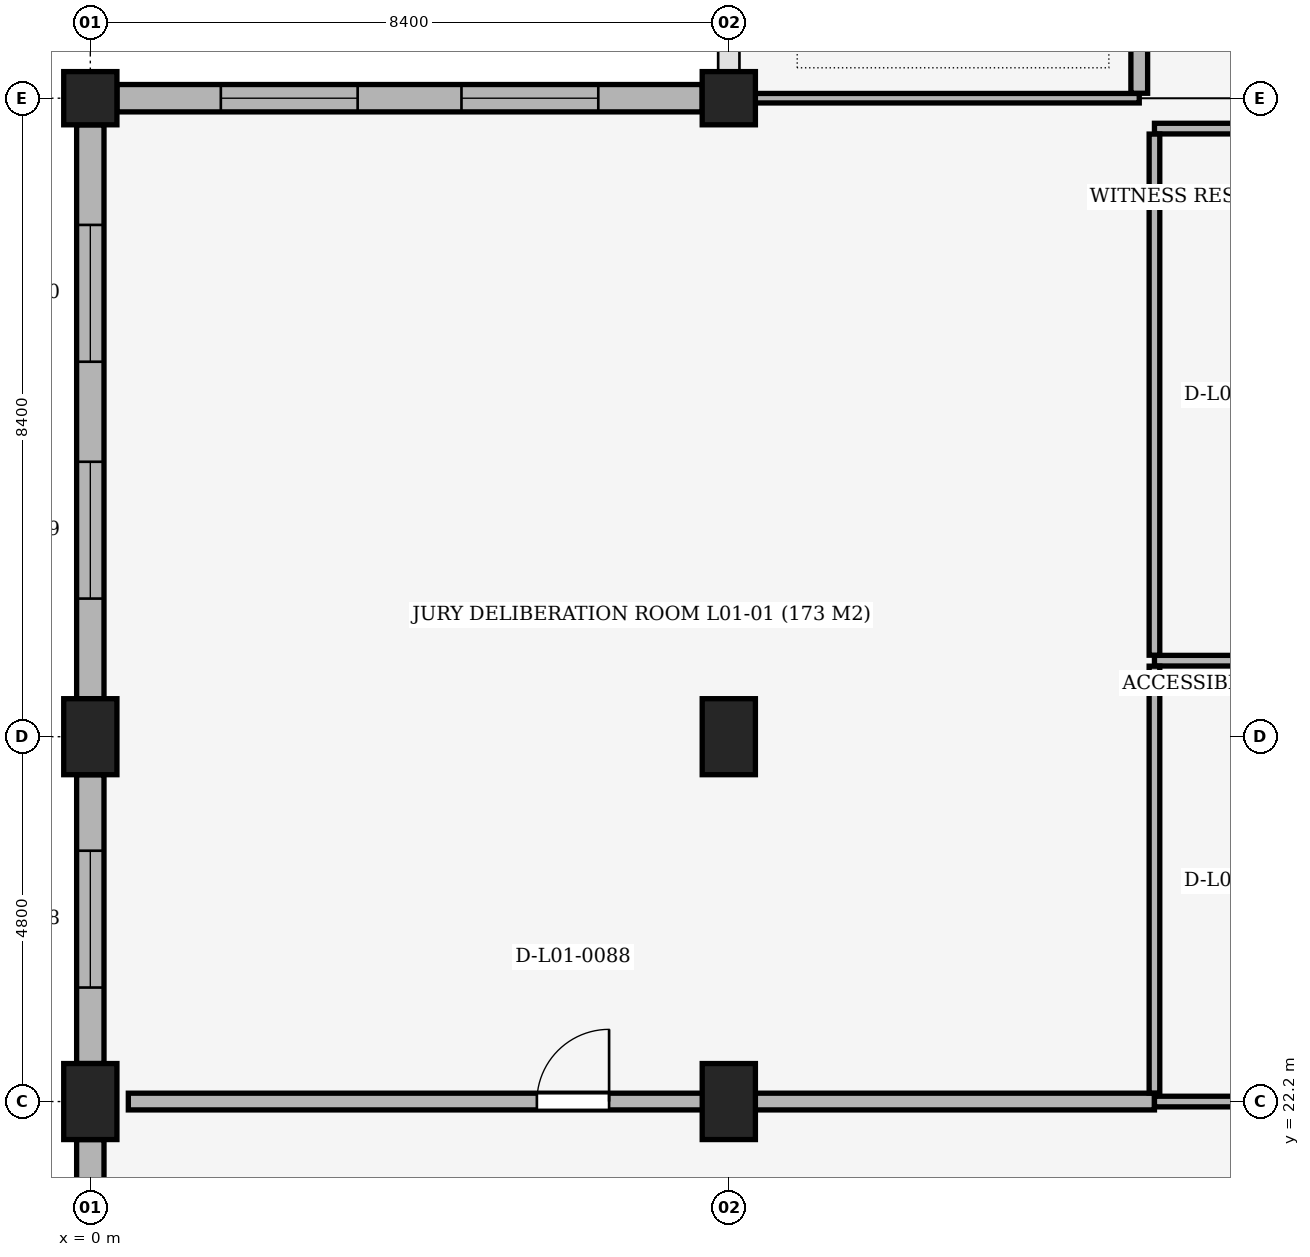
"""IFC4 building model, lengths in metres.
Left out: names, types, materials, properties, quantities, classifications, styles, units other than length and angle.
Written with IfcOpenShell. Run it as: python <this file> out.ifc"""

import sys

from ifc_helpers import new_model, si_unit, direction, frame, frame_2d, origin, origin_2d, place, context, subcontext, project, spatial, rectangle, extrude, element, fill, save


model = new_model("IFC4")
c1 = context("Model", 3, precision=1e-05, world=origin(), true_north=direction((0.0, 1.0)))
c2 = subcontext(c1, "Body", "Model", "MODEL_VIEW")
j1 = project(units=[si_unit("LENGTHUNIT", "METRE"), si_unit("PLANEANGLEUNIT", "RADIAN")], contexts=[c1])
p1 = place(None, origin())
s1 = spatial("IfcSite", under=j1, at=p1, CompositionType="ELEMENT")
p2 = place(p1, origin())
s2 = spatial("IfcBuilding", under=s1, at=p2, CompositionType="ELEMENT")
p3 = place(p2, frame((0.0, 0.0, 5.1)))
s3 = spatial("IfcBuildingStorey", under=s2, at=p3, CompositionType="ELEMENT", Elevation=5.1)
for number, where, z_axis, x_axis in (
    (1, (0.0, 22.2, 0.0), (0.0, 0.0, 1.0), (1.0, 0.0, 0.0)),
    (2, (0.0, 27.0, 0.0), (0.0, 0.0, 1.0), (1.0, 0.0, 0.0)),
):
    element("IfcColumn", number, at=place(p3, frame(where, z_axis=z_axis, x_axis=x_axis)), inside=s3, PredefinedType="COLUMN", context=c2, shape_type="SweptSolid", body=[
        extrude(rectangle(XDim=0.7, YDim=1.0, at=origin_2d()), origin(), (0.0, 0.0, 1.0), 5.1),
    ])
p4 = place(p3, frame((0.0, 35.4, 0.0), z_axis=(0.0, 0.0, 1.0), x_axis=(1.0, 0.0, 0.0)))
e3 = element("IfcColumn", 3, at=p4, inside=s3, PredefinedType="COLUMN", context=c2, shape_type="SweptSolid", body=[
    extrude(rectangle(XDim=0.7, YDim=0.7, at=origin_2d()), origin(), (0.0, 0.0, 1.0), 5.1),
])
for number, where, z_axis, x_axis in (
    (4, (8.4, 22.2, 0.0), (0.0, 0.0, 1.0), (1.0, 0.0, 0.0)),
    (5, (8.4, 27.0, 0.0), (0.0, 0.0, 1.0), (1.0, 0.0, 0.0)),
):
    element("IfcColumn", number, at=place(p3, frame(where, z_axis=z_axis, x_axis=x_axis)), inside=s3, PredefinedType="COLUMN", context=c2, shape_type="SweptSolid", body=[
        extrude(rectangle(XDim=0.7, YDim=1.0, at=origin_2d()), origin(), (0.0, 0.0, 1.0), 5.1),
    ])
p5 = place(p3, frame((8.4, 35.4, 0.0), z_axis=(0.0, 0.0, 1.0), x_axis=(1.0, 0.0, 0.0)))
e6 = element("IfcColumn", 6, at=p5, inside=s3, PredefinedType="COLUMN", context=c2, shape_type="SweptSolid", body=[
    extrude(rectangle(XDim=0.7, YDim=0.7, at=origin_2d()), origin(), (0.0, 0.0, 1.0), 5.1),
])
p6 = place(p3, frame((0.0, 5.9, 0.0), z_axis=(0.0, 0.0, 1.0), x_axis=(0.0, 1.0, 0.0)))
e7 = element("IfcWall", 7, at=p6, inside=s3, PredefinedType="SOLIDWALL", context=c2, shape_type="SweptSolid", body=[
    extrude(rectangle(XDim=15.8, YDim=0.36, at=frame_2d((7.9, 0.0))), origin(), (0.0, 0.0, 1.0), 3.67),
])
p7 = place(p6, frame((4.067, 0.0, 0.85)))
e8 = element("IfcOpeningElement", 8, at=p7, cuts=e7, PredefinedType="OPENING", context=c2, shape_type="SweptSolid", body=[
    extrude(rectangle(XDim=1.8, YDim=2.4, at=frame_2d((0.9, 1.2))), frame((0.0, 0.195, 0.0), z_axis=(0.0, -1.0, 0.0), x_axis=(1.0, 0.0, 0.0)), (0.0, 0.0, 1.0), 0.39),
])
p8 = place(p6, frame((9.933, 0.0, 0.85)))
e9 = element("IfcOpeningElement", 9, at=p8, cuts=e7, PredefinedType="OPENING", context=c2, shape_type="SweptSolid", body=[
    extrude(rectangle(XDim=1.8, YDim=2.4, at=frame_2d((0.9, 1.2))), frame((0.0, 0.195, 0.0), z_axis=(0.0, -1.0, 0.0), x_axis=(1.0, 0.0, 0.0)), (0.0, 0.0, 1.0), 0.39),
])
p9 = place(p3, frame((0.0, 22.7, 0.0), z_axis=(0.0, 0.0, 1.0), x_axis=(0.0, 1.0, 0.0)))
e10 = element("IfcWall", 10, at=p9, inside=s3, PredefinedType="SOLIDWALL", context=c2, shape_type="SweptSolid", body=[
    extrude(rectangle(XDim=3.8, YDim=0.36, at=frame_2d((1.9, 0.0))), origin(), (0.0, 0.0, 1.0), 4.27),
])
p10 = place(p9, frame((1.0, 0.0, 0.85)))
e11 = element("IfcOpeningElement", 11, at=p10, cuts=e10, PredefinedType="OPENING", context=c2, shape_type="SweptSolid", body=[
    extrude(rectangle(XDim=1.8, YDim=2.4, at=frame_2d((0.9, 1.2))), frame((0.0, 0.195, 0.0), z_axis=(0.0, -1.0, 0.0), x_axis=(1.0, 0.0, 0.0)), (0.0, 0.0, 1.0), 0.39),
])
p11 = place(p3, frame((0.0, 27.5, 0.0), z_axis=(0.0, 0.0, 1.0), x_axis=(0.0, 1.0, 0.0)))
e12 = element("IfcWall", 12, at=p11, inside=s3, PredefinedType="SOLIDWALL", context=c2, shape_type="SweptSolid", body=[
    extrude(rectangle(XDim=7.55, YDim=0.36, at=frame_2d((3.775, 0.0))), origin(), (0.0, 0.0, 1.0), 4.02),
])
p12 = place(p11, frame((1.317, 0.0, 0.85)))
e13 = element("IfcOpeningElement", 13, at=p12, cuts=e12, PredefinedType="OPENING", context=c2, shape_type="SweptSolid", body=[
    extrude(rectangle(XDim=1.8, YDim=2.4, at=frame_2d((0.9, 1.2))), frame((0.0, 0.195, 0.0), z_axis=(0.0, -1.0, 0.0), x_axis=(1.0, 0.0, 0.0)), (0.0, 0.0, 1.0), 0.39),
])
p13 = place(p11, frame((4.433, 0.0, 0.85)))
e14 = element("IfcOpeningElement", 14, at=p13, cuts=e12, PredefinedType="OPENING", context=c2, shape_type="SweptSolid", body=[
    extrude(rectangle(XDim=1.8, YDim=2.4, at=frame_2d((0.9, 1.2))), frame((0.0, 0.195, 0.0), z_axis=(0.0, -1.0, 0.0), x_axis=(1.0, 0.0, 0.0)), (0.0, 0.0, 1.0), 0.39),
])
p14 = place(p3, frame((0.35, 35.4, 0.0), z_axis=(0.0, 0.0, 1.0), x_axis=(1.0, 0.0, 0.0)))
e15 = element("IfcWall", 15, at=p14, inside=s3, PredefinedType="SOLIDWALL", context=c2, shape_type="SweptSolid", body=[
    extrude(rectangle(XDim=7.7, YDim=0.36, at=frame_2d((3.85, 0.0))), origin(), (0.0, 0.0, 1.0), 4.07),
])
p15 = place(p14, frame((1.367, 0.0, 0.85)))
e16 = element("IfcOpeningElement", 16, at=p15, cuts=e15, PredefinedType="OPENING", context=c2, shape_type="SweptSolid", body=[
    extrude(rectangle(XDim=1.8, YDim=2.4, at=frame_2d((0.9, 1.2))), frame((0.0, 0.195, 0.0), z_axis=(0.0, -1.0, 0.0), x_axis=(1.0, 0.0, 0.0)), (0.0, 0.0, 1.0), 0.39),
])
p16 = place(p14, frame((4.533, 0.0, 0.85)))
e17 = element("IfcOpeningElement", 17, at=p16, cuts=e15, PredefinedType="OPENING", context=c2, shape_type="SweptSolid", body=[
    extrude(rectangle(XDim=1.8, YDim=2.4, at=frame_2d((0.9, 1.2))), frame((0.0, 0.195, 0.0), z_axis=(0.0, -1.0, 0.0), x_axis=(1.0, 0.0, 0.0)), (0.0, 0.0, 1.0), 0.39),
])
p17 = place(p3, frame((0.5, 22.2, 0.0), z_axis=(0.0, 0.0, 1.0), x_axis=(1.0, 0.0, 0.0)))
e18 = element("IfcWall", 18, at=p17, inside=s3, PredefinedType="PARTITIONING", context=c2, shape_type="SweptSolid", body=[
    extrude(rectangle(XDim=13.5, YDim=0.22, at=frame_2d((6.75, 0.0))), origin(), (0.0, 0.0, 1.0), 4.07),
])
p18 = place(p17, frame((5.375, 0.0, 0.0)))
e19 = element("IfcOpeningElement", 19, at=p18, cuts=e18, PredefinedType="OPENING", context=c2, shape_type="SweptSolid", body=[
    extrude(rectangle(XDim=0.95, YDim=2.1, at=frame_2d((0.475, 1.05))), frame((0.0, 0.125, 0.0), z_axis=(0.0, -1.0, 0.0), x_axis=(1.0, 0.0, 0.0)), (0.0, 0.0, 1.0), 0.25),
])
p19 = place(p3, frame((14.0, 22.2, 0.0), z_axis=(0.0, 0.0, 1.0), x_axis=(1.0, 0.0, 0.0)))
e20 = element("IfcWall", 20, at=p19, inside=s3, PredefinedType="PARTITIONING", context=c2, shape_type="SweptSolid", body=[
    extrude(rectangle(XDim=3.6, YDim=0.14, at=frame_2d((1.8, 0.0))), origin(), (0.0, 0.0, 1.0), 4.07),
])
for number, where, z_axis, x_axis in (
    (21, (14.0, 28.0, 0.0), (0.0, 0.0, 1.0), (1.0, 0.0, 0.0)),
    (22, (14.0, 35.0, 0.0), (0.0, 0.0, 1.0), (1.0, 0.0, 0.0)),
):
    element("IfcWall", number, at=place(p3, frame(where, z_axis=z_axis, x_axis=x_axis)), inside=s3, PredefinedType="PARTITIONING", context=c2, shape_type="SweptSolid", body=[
        extrude(rectangle(XDim=3.6, YDim=0.14, at=frame_2d((1.8, 0.0))), origin(), (0.0, 0.0, 1.0), 4.02),
    ])
p20 = place(p3, frame((8.425, 35.4, 0.0), z_axis=(0.0, 0.0, 1.0), x_axis=(1.0, 0.0, 0.0)))
e23 = element("IfcWall", 23, at=p20, inside=s3, PredefinedType="PARTITIONING", context=c2, shape_type="SweptSolid", body=[
    extrude(rectangle(XDim=5.375, YDim=0.125, at=frame_2d((2.688, 0.0))), origin(), (0.0, 0.0, 1.0), 4.07),
])
p21 = place(p3, frame((13.8, 35.465, 0.0), z_axis=(0.0, 0.0, 1.0), x_axis=(0.0, 1.0, 0.0)))
e24 = element("IfcWall", 24, at=p21, inside=s3, PredefinedType="PARTITIONING", context=c2, shape_type="SweptSolid", body=[
    extrude(rectangle(XDim=64.058, YDim=0.22, at=frame_2d((32.029, 0.0))), origin(), (0.0, 0.0, 1.0), 4.07),
])
p22 = place(p21, frame((31.229, 0.0, 0.0)))
e25 = element("IfcOpeningElement", 25, at=p22, cuts=e24, PredefinedType="OPENING", context=c2, shape_type="SweptSolid", body=[
    extrude(rectangle(XDim=1.6, YDim=2.3, at=frame_2d((0.8, 1.15))), frame((0.0, 0.125, 0.0), z_axis=(0.0, -1.0, 0.0), x_axis=(1.0, 0.0, 0.0)), (0.0, 0.0, 1.0), 0.25),
])
p23 = place(p3, frame((14.0, 22.312, 0.0), z_axis=(0.0, 0.0, 1.0), x_axis=(0.0, 1.0, 0.0)))
e26 = element("IfcWall", 26, at=p23, inside=s3, PredefinedType="PARTITIONING", context=c2, shape_type="SweptSolid", body=[
    extrude(rectangle(XDim=5.616, YDim=0.14, at=frame_2d((2.808, 0.0))), origin(), (0.0, 0.0, 1.0), 4.07),
])
p24 = place(p3, frame((14.0, 28.072, 0.0), z_axis=(0.0, 0.0, 1.0), x_axis=(0.0, 1.0, 0.0)))
e27 = element("IfcWall", 27, at=p24, inside=s3, PredefinedType="PARTITIONING", context=c2, shape_type="SweptSolid", body=[
    extrude(rectangle(XDim=6.856, YDim=0.14, at=frame_2d((3.428, 0.0))), origin(), (0.0, 0.0, 1.0), 4.37),
])
p25 = place(p10, origin())
e28 = element("IfcWindow", 28, at=p25, inside=s3, PartitioningType="SINGLE_PANEL", PredefinedType="WINDOW", context=c2, shape_type="SweptSolid", body=[
    extrude(rectangle(XDim=1.8, YDim=2.4, at=frame_2d((0.9, 1.2))), frame((0.0, 0.03, 0.0), z_axis=(0.0, -1.0, 0.0), x_axis=(1.0, 0.0, 0.0)), (0.0, 0.0, 1.0), 0.06),
])
fill(e11, e28)
p26 = place(p12, origin())
e29 = element("IfcWindow", 29, at=p26, inside=s3, PartitioningType="SINGLE_PANEL", PredefinedType="WINDOW", context=c2, shape_type="SweptSolid", body=[
    extrude(rectangle(XDim=1.8, YDim=2.4, at=frame_2d((0.9, 1.2))), frame((0.0, 0.03, 0.0), z_axis=(0.0, -1.0, 0.0), x_axis=(1.0, 0.0, 0.0)), (0.0, 0.0, 1.0), 0.06),
])
fill(e13, e29)
p27 = place(p13, origin())
e30 = element("IfcWindow", 30, at=p27, inside=s3, PartitioningType="SINGLE_PANEL", PredefinedType="WINDOW", context=c2, shape_type="SweptSolid", body=[
    extrude(rectangle(XDim=1.8, YDim=2.4, at=frame_2d((0.9, 1.2))), frame((0.0, 0.03, 0.0), z_axis=(0.0, -1.0, 0.0), x_axis=(1.0, 0.0, 0.0)), (0.0, 0.0, 1.0), 0.06),
])
fill(e14, e30)
p28 = place(p15, origin())
e31 = element("IfcWindow", 31, at=p28, inside=s3, PartitioningType="SINGLE_PANEL", PredefinedType="WINDOW", context=c2, shape_type="SweptSolid", body=[
    extrude(rectangle(XDim=1.8, YDim=2.4, at=frame_2d((0.9, 1.2))), frame((0.0, 0.03, 0.0), z_axis=(0.0, -1.0, 0.0), x_axis=(1.0, 0.0, 0.0)), (0.0, 0.0, 1.0), 0.06),
])
fill(e16, e31)
p29 = place(p16, origin())
e32 = element("IfcWindow", 32, at=p29, inside=s3, PartitioningType="SINGLE_PANEL", PredefinedType="WINDOW", context=c2, shape_type="SweptSolid", body=[
    extrude(rectangle(XDim=1.8, YDim=2.4, at=frame_2d((0.9, 1.2))), frame((0.0, 0.03, 0.0), z_axis=(0.0, -1.0, 0.0), x_axis=(1.0, 0.0, 0.0)), (0.0, 0.0, 1.0), 0.06),
])
fill(e17, e32)
p30 = place(p18, origin())
e33 = element("IfcDoor", 33, at=p30, inside=s3, OperationType="SINGLE_SWING_RIGHT", PredefinedType="DOOR", context=c2, shape_type="SweptSolid", body=[
    extrude(rectangle(XDim=0.95, YDim=2.1, at=frame_2d((0.475, 1.05))), frame((0.0, 0.025, 0.0), z_axis=(0.0, -1.0, 0.0), x_axis=(1.0, 0.0, 0.0)), (0.0, 0.0, 1.0), 0.05),
])
fill(e19, e33)
save(model, sys.argv[1])
